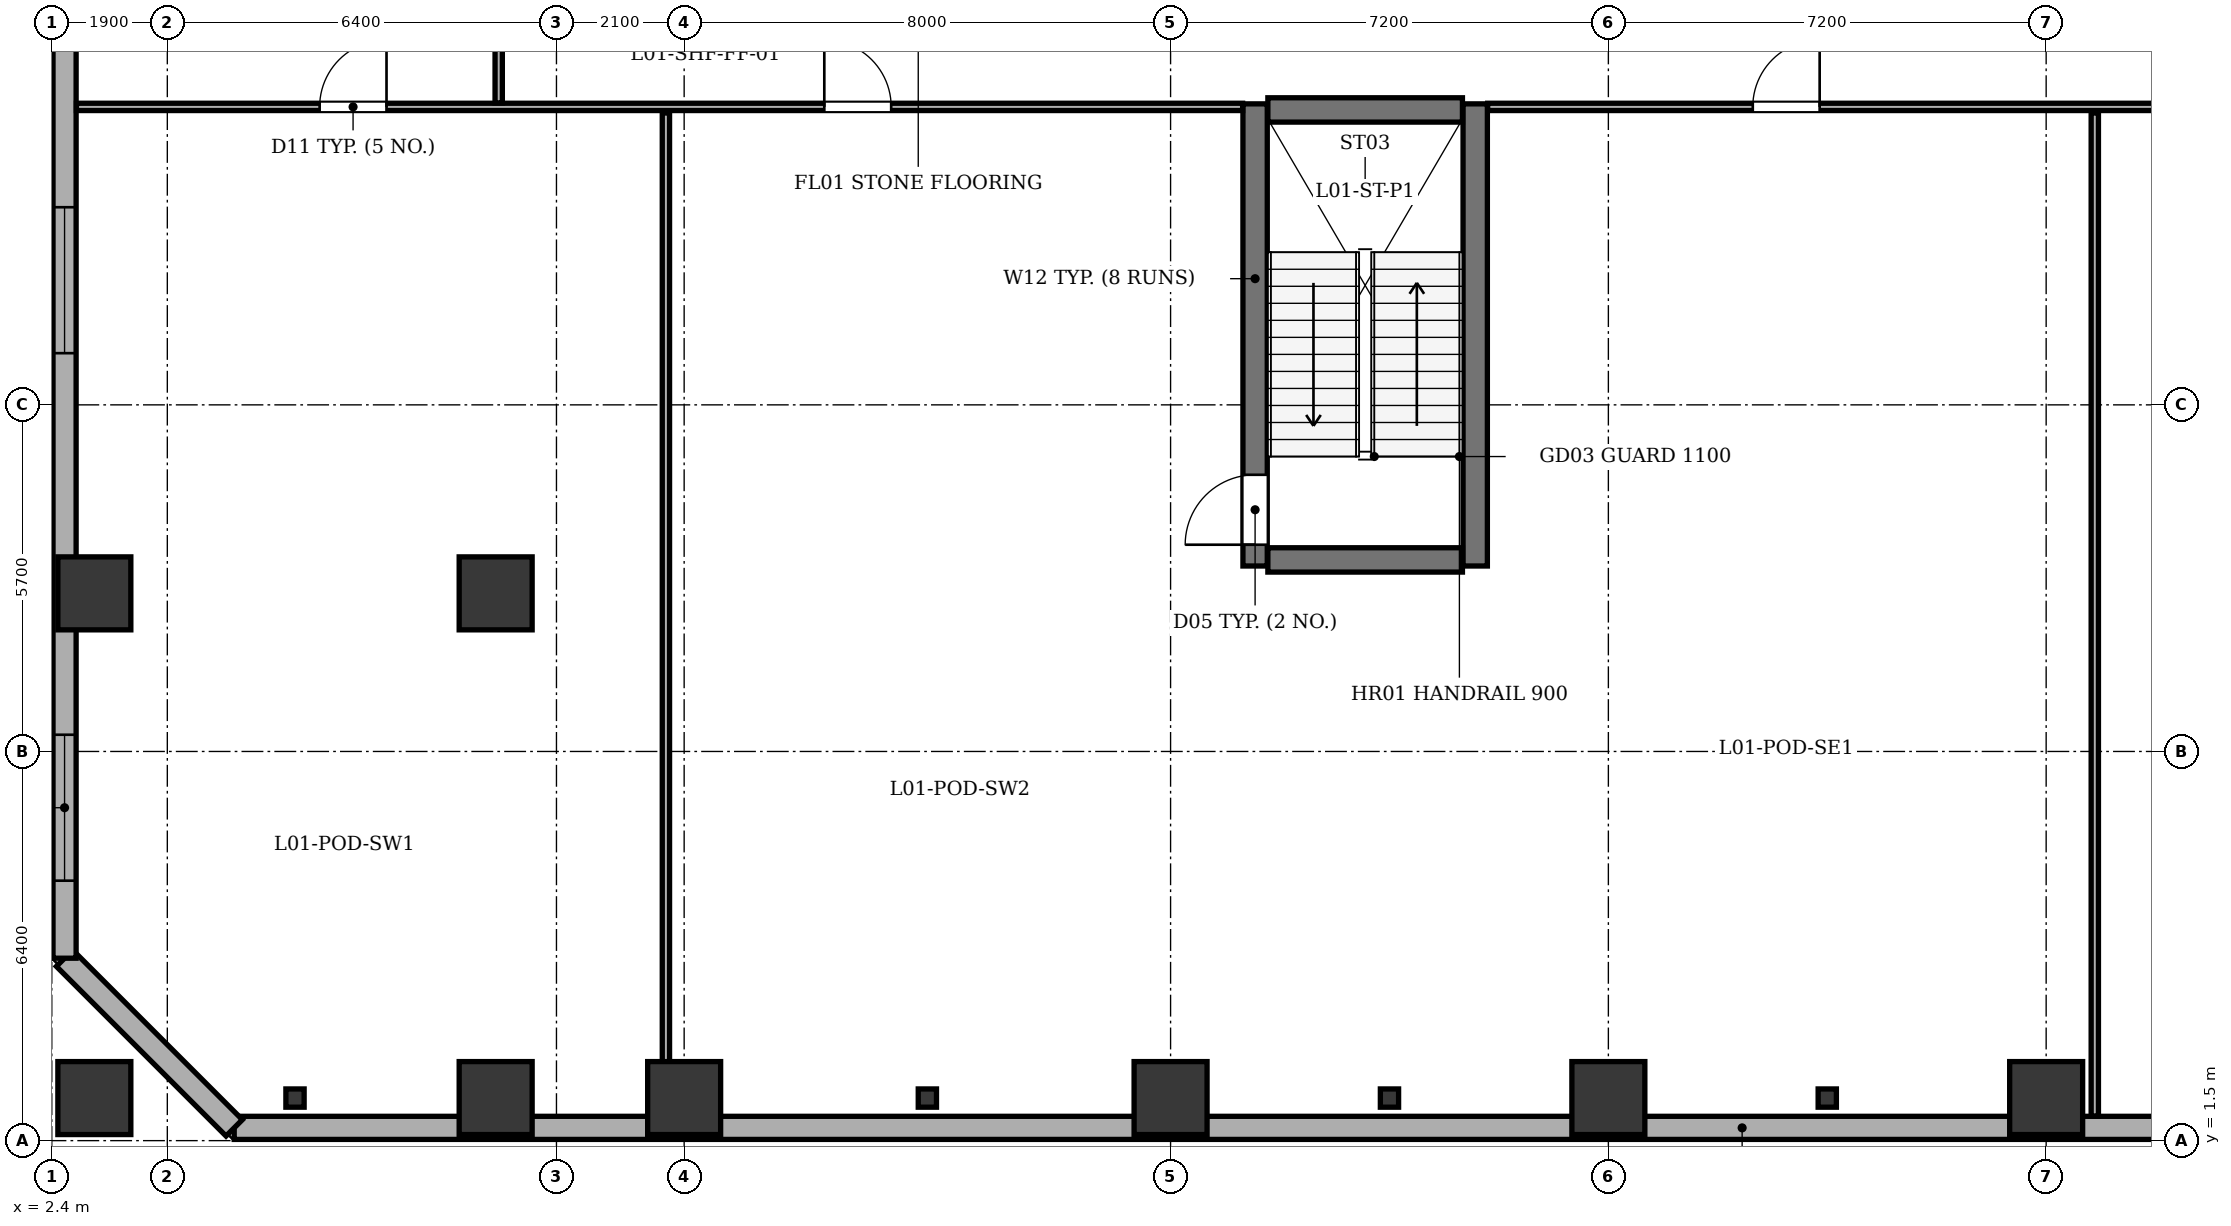
"""IFC4 building model, lengths in metres.
Left out: names, types, materials, properties, quantities, classifications, styles, units other than length and angle.
Written with IfcOpenShell. Run it as: python <this file> out.ifc"""

import sys

from ifc_helpers import new_model, si_unit, direction, frame, frame_2d, origin, origin_2d, place, context, subcontext, project, spatial, rectangle, i_section, extrude, element, fill, save


model = new_model("IFC4")
c1 = context("Model", 3, precision=1e-05, world=origin(), true_north=direction((0.0, 1.0)))
c2 = subcontext(c1, "Body", "Model", "MODEL_VIEW")
j1 = project(units=[si_unit("LENGTHUNIT", "METRE"), si_unit("PLANEANGLEUNIT", "RADIAN")], contexts=[c1])
p1 = place(None, origin())
s1 = spatial("IfcSite", under=j1, at=p1, CompositionType="ELEMENT")
p2 = place(p1, origin())
s2 = spatial("IfcBuilding", under=s1, at=p2, CompositionType="ELEMENT")
p3 = place(p2, frame((0.0, 0.0, 5.4)))
s3 = spatial("IfcBuildingStorey", under=s2, at=p3, CompositionType="ELEMENT", Elevation=5.4)
for number, where, z_axis, x_axis in (
    (1, (3.1, 2.2, 0.0), (0.0, 0.0, 1.0), (1.0, 0.0, 0.0)),
    (2, (9.7, 2.2, 0.0), (0.0, 0.0, 1.0), (1.0, 0.0, 0.0)),
    (3, (12.8, 2.2, 0.0), (0.0, 0.0, 1.0), (1.0, 0.0, 0.0)),
    (4, (20.8, 2.2, 0.0), (0.0, 0.0, 1.0), (1.0, 0.0, 0.0)),
    (5, (28.0, 2.2, 0.0), (0.0, 0.0, 1.0), (1.0, 0.0, 0.0)),
    (6, (35.2, 2.2, 0.0), (0.0, 0.0, 1.0), (1.0, 0.0, 0.0)),
    (7, (3.1, 10.5, 0.0), (0.0, 0.0, 1.0), (1.0, 0.0, 0.0)),
    (8, (9.7, 10.5, 0.0), (0.0, 0.0, 1.0), (1.0, 0.0, 0.0)),
):
    element("IfcColumn", number, at=place(p3, frame(where, z_axis=z_axis, x_axis=x_axis)), inside=s3, PredefinedType="COLUMN", context=c2, shape_type="SweptSolid", body=[
        extrude(rectangle(XDim=1.2, YDim=1.2, at=origin_2d()), origin(), (0.0, 0.0, 1.0), 4.5),
    ])
for number, where, z_axis, x_axis in (
    (9, (6.4, 2.2, 0.0), (0.0, 0.0, 1.0), (1.0, 0.0, 0.0)),
    (10, (16.8, 2.2, 0.0), (0.0, 0.0, 1.0), (1.0, 0.0, 0.0)),
    (11, (24.4, 2.2, 0.0), (0.0, 0.0, 1.0), (1.0, 0.0, 0.0)),
    (12, (31.6, 2.2, 0.0), (0.0, 0.0, 1.0), (1.0, 0.0, 0.0)),
):
    element("IfcColumn", number, at=place(p3, frame(where, z_axis=z_axis, x_axis=x_axis)), inside=s3, PredefinedType="PILASTER", context=c2, shape_type="SweptSolid", body=[
        extrude(i_section(OverallWidth=0.3, OverallDepth=0.3, WebThickness=0.011, FlangeThickness=0.019, at=origin_2d()), origin(), (0.0, 0.0, 1.0), 4.18),
    ])
p4 = place(p3, frame((55.0, 1.71, 0.0), z_axis=(0.0, 0.0, 1.0), x_axis=(-1.0, 0.0, 0.0)))
e13 = element("IfcWall", 13, at=p4, inside=s3, PredefinedType="STANDARD", context=c2, shape_type="SweptSolid", body=[
    extrude(rectangle(XDim=49.6, YDim=0.38, at=frame_2d((24.8, 0.0))), origin(), (0.0, 0.0, 1.0), 4.18),
])
p5 = place(p3, frame((5.4, 1.71, 0.0), z_axis=(0.0, 0.0, 1.0), x_axis=(-0.707075841688, 0.707137719332, 0.0)))
e14 = element("IfcWall", 14, at=p5, inside=s3, PredefinedType="STANDARD", context=c2, shape_type="SweptSolid", body=[
    extrude(rectangle(XDim=3.946, YDim=0.38, at=frame_2d((1.973, 0.0))), origin(), (0.0, 0.0, 1.0), 4.18),
])
p6 = place(p3, frame((2.61, 4.5, 0.0), z_axis=(0.0, 0.0, 1.0), x_axis=(0.0, 1.0, 0.0)))
e15 = element("IfcWall", 15, at=p6, inside=s3, PredefinedType="STANDARD", context=c2, shape_type="SweptSolid", body=[
    extrude(rectangle(XDim=45.4, YDim=0.38, at=frame_2d((22.7, 0.0))), origin(), (0.0, 0.0, 1.0), 4.18),
])
p7 = place(p6, frame((1.275, 0.0, 0.75)))
e16 = element("IfcOpeningElement", 16, at=p7, cuts=e15, PredefinedType="OPENING", context=c2, shape_type="SweptSolid", body=[
    extrude(rectangle(XDim=2.4, YDim=2.1, at=frame_2d((1.2, 1.05))), frame((0.0, 0.2, 0.0), z_axis=(0.0, -1.0, 0.0), x_axis=(1.0, 0.0, 0.0)), (0.0, 0.0, 1.0), 0.4),
])
p8 = place(p6, frame((9.95, 0.0, 0.75)))
e17 = element("IfcOpeningElement", 17, at=p8, cuts=e15, PredefinedType="OPENING", context=c2, shape_type="SweptSolid", body=[
    extrude(rectangle(XDim=2.4, YDim=2.1, at=frame_2d((1.2, 1.05))), frame((0.0, 0.2, 0.0), z_axis=(0.0, -1.0, 0.0), x_axis=(1.0, 0.0, 0.0)), (0.0, 0.0, 1.0), 0.4),
])
p9 = place(p6, frame((18.3, 0.0, 0.75)))
e18 = element("IfcOpeningElement", 18, at=p9, cuts=e15, PredefinedType="OPENING", context=c2, shape_type="SweptSolid", body=[
    extrude(rectangle(XDim=2.4, YDim=2.1, at=frame_2d((1.2, 1.05))), frame((0.0, 0.2, 0.0), z_axis=(0.0, -1.0, 0.0), x_axis=(1.0, 0.0, 0.0)), (0.0, 0.0, 1.0), 0.4),
])
p10 = place(p6, frame((24.7, 0.0, 0.75)))
e19 = element("IfcOpeningElement", 19, at=p10, cuts=e15, PredefinedType="OPENING", context=c2, shape_type="SweptSolid", body=[
    extrude(rectangle(XDim=2.4, YDim=2.1, at=frame_2d((1.2, 1.05))), frame((0.0, 0.2, 0.0), z_axis=(0.0, -1.0, 0.0), x_axis=(1.0, 0.0, 0.0)), (0.0, 0.0, 1.0), 0.4),
])
p11 = place(p6, frame((33.05, 0.0, 0.75)))
e20 = element("IfcOpeningElement", 20, at=p11, cuts=e15, PredefinedType="OPENING", context=c2, shape_type="SweptSolid", body=[
    extrude(rectangle(XDim=2.4, YDim=2.1, at=frame_2d((1.2, 1.05))), frame((0.0, 0.2, 0.0), z_axis=(0.0, -1.0, 0.0), x_axis=(1.0, 0.0, 0.0)), (0.0, 0.0, 1.0), 0.4),
])
p12 = place(p6, frame((41.725, 0.0, 0.75)))
e21 = element("IfcOpeningElement", 21, at=p12, cuts=e15, PredefinedType="OPENING", context=c2, shape_type="SweptSolid", body=[
    extrude(rectangle(XDim=2.4, YDim=2.1, at=frame_2d((1.2, 1.05))), frame((0.0, 0.2, 0.0), z_axis=(0.0, -1.0, 0.0), x_axis=(1.0, 0.0, 0.0)), (0.0, 0.0, 1.0), 0.4),
])
p13 = place(p3, frame((22.19, 10.95, 0.0), z_axis=(0.0, 0.0, 1.0), x_axis=(0.0, 1.0, 0.0)))
e22 = element("IfcWall", 22, at=p13, inside=s3, PredefinedType="SHEAR", context=c2, shape_type="SweptSolid", body=[
    extrude(rectangle(XDim=7.6, YDim=0.4, at=frame_2d((3.8, 0.0))), origin(), (0.0, 0.0, 1.0), 4.18),
])
p14 = place(p13, frame((0.35, 0.0, 0.0)))
e23 = element("IfcOpeningElement", 23, at=p14, cuts=e22, PredefinedType="OPENING", context=c2, shape_type="SweptSolid", body=[
    extrude(rectangle(XDim=1.15, YDim=2.15, at=frame_2d((0.575, 1.075))), frame((0.0, 0.21, 0.0), z_axis=(0.0, -1.0, 0.0), x_axis=(1.0, 0.0, 0.0)), (0.0, 0.0, 1.0), 0.42),
])
p15 = place(p3, frame((25.81, 10.95, 0.0), z_axis=(0.0, 0.0, 1.0), x_axis=(0.0, 1.0, 0.0)))
e24 = element("IfcWall", 24, at=p15, inside=s3, PredefinedType="SHEAR", context=c2, shape_type="SweptSolid", body=[
    extrude(rectangle(XDim=7.6, YDim=0.4, at=frame_2d((3.8, 0.0))), origin(), (0.0, 0.0, 1.0), 4.18),
])
for number, where, z_axis, x_axis in (
    (25, (22.4, 11.05, 0.0), (0.0, 0.0, 1.0), (1.0, 0.0, 0.0)),
    (26, (22.4, 18.45, 0.0), (0.0, 0.0, 1.0), (1.0, 0.0, 0.0)),
):
    element("IfcWall", number, at=place(p3, frame(where, z_axis=z_axis, x_axis=x_axis)), inside=s3, PredefinedType="SHEAR", context=c2, shape_type="SweptSolid", body=[
        extrude(rectangle(XDim=3.2, YDim=0.4, at=frame_2d((1.6, 0.0))), origin(), (0.0, 0.0, 1.0), 4.18),
    ])
p16 = place(p3, frame((2.805, 18.5, 0.0), z_axis=(0.0, 0.0, 1.0), x_axis=(1.0, 0.0, 0.0)))
e27 = element("IfcWall", 27, at=p16, inside=s3, PredefinedType="PARTITIONING", context=c2, shape_type="SweptSolid", body=[
    extrude(rectangle(XDim=19.18, YDim=0.12, at=frame_2d((9.59, 0.0))), origin(), (0.0, 0.0, 1.0), 3.665),
])
p17 = place(p16, frame((4.0, 0.0, 0.0)))
e28 = element("IfcOpeningElement", 28, at=p17, cuts=e27, PredefinedType="OPENING", context=c2, shape_type="SweptSolid", body=[
    extrude(rectangle(XDim=1.1, YDim=2.15, at=frame_2d((0.55, 1.075))), frame((0.0, 0.07, 0.0), z_axis=(0.0, -1.0, 0.0), x_axis=(1.0, 0.0, 0.0)), (0.0, 0.0, 1.0), 0.14),
])
p18 = place(p16, frame((12.3, 0.0, 0.0)))
e29 = element("IfcOpeningElement", 29, at=p18, cuts=e27, PredefinedType="OPENING", context=c2, shape_type="SweptSolid", body=[
    extrude(rectangle(XDim=1.1, YDim=2.15, at=frame_2d((0.55, 1.075))), frame((0.0, 0.07, 0.0), z_axis=(0.0, -1.0, 0.0), x_axis=(1.0, 0.0, 0.0)), (0.0, 0.0, 1.0), 0.14),
])
p19 = place(p3, frame((26.015, 18.5, 0.0), z_axis=(0.0, 0.0, 1.0), x_axis=(1.0, 0.0, 0.0)))
e30 = element("IfcWall", 30, at=p19, inside=s3, PredefinedType="PARTITIONING", context=c2, shape_type="SweptSolid", body=[
    extrude(rectangle(XDim=31.58, YDim=0.12, at=frame_2d((15.79, 0.0))), origin(), (0.0, 0.0, 1.0), 3.665),
])
p20 = place(p19, frame((4.36, 0.0, 0.0)))
e31 = element("IfcOpeningElement", 31, at=p20, cuts=e30, PredefinedType="OPENING", context=c2, shape_type="SweptSolid", body=[
    extrude(rectangle(XDim=1.1, YDim=2.15, at=frame_2d((0.55, 1.075))), frame((0.0, 0.07, 0.0), z_axis=(0.0, -1.0, 0.0), x_axis=(1.0, 0.0, 0.0)), (0.0, 0.0, 1.0), 0.14),
])
p21 = place(p19, frame((14.685, 0.0, 0.0)))
e32 = element("IfcOpeningElement", 32, at=p21, cuts=e30, PredefinedType="OPENING", context=c2, shape_type="SweptSolid", body=[
    extrude(rectangle(XDim=1.1, YDim=2.15, at=frame_2d((0.55, 1.075))), frame((0.0, 0.07, 0.0), z_axis=(0.0, -1.0, 0.0), x_axis=(1.0, 0.0, 0.0)), (0.0, 0.0, 1.0), 0.14),
])
p22 = place(p19, frame((25.185, 0.0, 0.0)))
e33 = element("IfcOpeningElement", 33, at=p22, cuts=e30, PredefinedType="OPENING", context=c2, shape_type="SweptSolid", body=[
    extrude(rectangle(XDim=1.1, YDim=2.15, at=frame_2d((0.55, 1.075))), frame((0.0, 0.07, 0.0), z_axis=(0.0, -1.0, 0.0), x_axis=(1.0, 0.0, 0.0)), (0.0, 0.0, 1.0), 0.14),
])
p23 = place(p3, frame((12.5, 1.905, 0.0), z_axis=(0.0, 0.0, 1.0), x_axis=(0.0, 1.0, 0.0)))
e34 = element("IfcWall", 34, at=p23, inside=s3, PredefinedType="PARTITIONING", context=c2, shape_type="SweptSolid", body=[
    extrude(rectangle(XDim=16.495, YDim=0.12, at=frame_2d((8.248, 0.0))), origin(), (0.0, 0.0, 1.0), 3.065),
])
p24 = place(p3, frame((36.0, 1.905, 0.0), z_axis=(0.0, 0.0, 1.0), x_axis=(0.0, 1.0, 0.0)))
e35 = element("IfcWall", 35, at=p24, inside=s3, PredefinedType="PARTITIONING", context=c2, shape_type="SweptSolid", body=[
    extrude(rectangle(XDim=16.495, YDim=0.12, at=frame_2d((8.248, 0.0))), origin(), (0.0, 0.0, 1.0), 4.18),
])
p25 = place(p3, frame((9.75, 18.565, 0.0), z_axis=(0.0, 0.0, 1.0), x_axis=(0.0, 1.0, 0.0)))
e36 = element("IfcWall", 36, at=p25, inside=s3, PredefinedType="PARTITIONING", context=c2, shape_type="SweptSolid", body=[
    extrude(rectangle(XDim=19.72, YDim=0.12, at=frame_2d((9.86, 0.0))), origin(), (0.0, 0.0, 1.0), 3.065),
])
p26 = place(p25, frame((7.985, 0.0, 0.0)))
e37 = element("IfcOpeningElement", 37, at=p26, cuts=e36, PredefinedType="OPENING", context=c2, shape_type="SweptSolid", body=[
    extrude(rectangle(XDim=1.0, YDim=2.1, at=frame_2d((0.5, 1.05))), frame((0.0, 0.07, 0.0), z_axis=(0.0, -1.0, 0.0), x_axis=(1.0, 0.0, 0.0)), (0.0, 0.0, 1.0), 0.14),
])
p27 = place(p7, origin())
e38 = element("IfcWindow", 38, at=p27, inside=s3, PartitioningType="SINGLE_PANEL", PredefinedType="WINDOW", context=c2, shape_type="SweptSolid", body=[
    extrude(rectangle(XDim=2.4, YDim=2.1, at=frame_2d((1.2, 1.05))), frame((0.0, 0.03, 0.0), z_axis=(0.0, -1.0, 0.0), x_axis=(1.0, 0.0, 0.0)), (0.0, 0.0, 1.0), 0.06),
])
fill(e16, e38)
p28 = place(p8, origin())
e39 = element("IfcWindow", 39, at=p28, inside=s3, PartitioningType="SINGLE_PANEL", PredefinedType="WINDOW", context=c2, shape_type="SweptSolid", body=[
    extrude(rectangle(XDim=2.4, YDim=2.1, at=frame_2d((1.2, 1.05))), frame((0.0, 0.03, 0.0), z_axis=(0.0, -1.0, 0.0), x_axis=(1.0, 0.0, 0.0)), (0.0, 0.0, 1.0), 0.06),
])
fill(e17, e39)
p29 = place(p14, origin())
e40 = element("IfcDoor", 40, at=p29, inside=s3, OperationType="SINGLE_SWING_LEFT", PredefinedType="DOOR", context=c2, shape_type="SweptSolid", body=[
    extrude(rectangle(XDim=1.15, YDim=2.15, at=frame_2d((0.575, 1.075))), frame((0.0, 0.025, 0.0), z_axis=(0.0, -1.0, 0.0), x_axis=(1.0, 0.0, 0.0)), (0.0, 0.0, 1.0), 0.05),
])
fill(e23, e40)
p30 = place(p17, origin())
e41 = element("IfcDoor", 41, at=p30, inside=s3, OperationType="SINGLE_SWING_RIGHT", PredefinedType="DOOR", context=c2, shape_type="SweptSolid", body=[
    extrude(rectangle(XDim=1.1, YDim=2.15, at=frame_2d((0.55, 1.075))), frame((0.0, 0.025, 0.0), z_axis=(0.0, -1.0, 0.0), x_axis=(1.0, 0.0, 0.0)), (0.0, 0.0, 1.0), 0.05),
])
fill(e28, e41)
p31 = place(p18, origin())
e42 = element("IfcDoor", 42, at=p31, inside=s3, OperationType="SINGLE_SWING_LEFT", PredefinedType="DOOR", context=c2, shape_type="SweptSolid", body=[
    extrude(rectangle(XDim=1.1, YDim=2.15, at=frame_2d((0.55, 1.075))), frame((0.0, 0.025, 0.0), z_axis=(0.0, -1.0, 0.0), x_axis=(1.0, 0.0, 0.0)), (0.0, 0.0, 1.0), 0.05),
])
fill(e29, e42)
p32 = place(p20, origin())
e43 = element("IfcDoor", 43, at=p32, inside=s3, OperationType="SINGLE_SWING_RIGHT", PredefinedType="DOOR", context=c2, shape_type="SweptSolid", body=[
    extrude(rectangle(XDim=1.1, YDim=2.15, at=frame_2d((0.55, 1.075))), frame((0.0, 0.025, 0.0), z_axis=(0.0, -1.0, 0.0), x_axis=(1.0, 0.0, 0.0)), (0.0, 0.0, 1.0), 0.05),
])
fill(e31, e43)
save(model, sys.argv[1])
